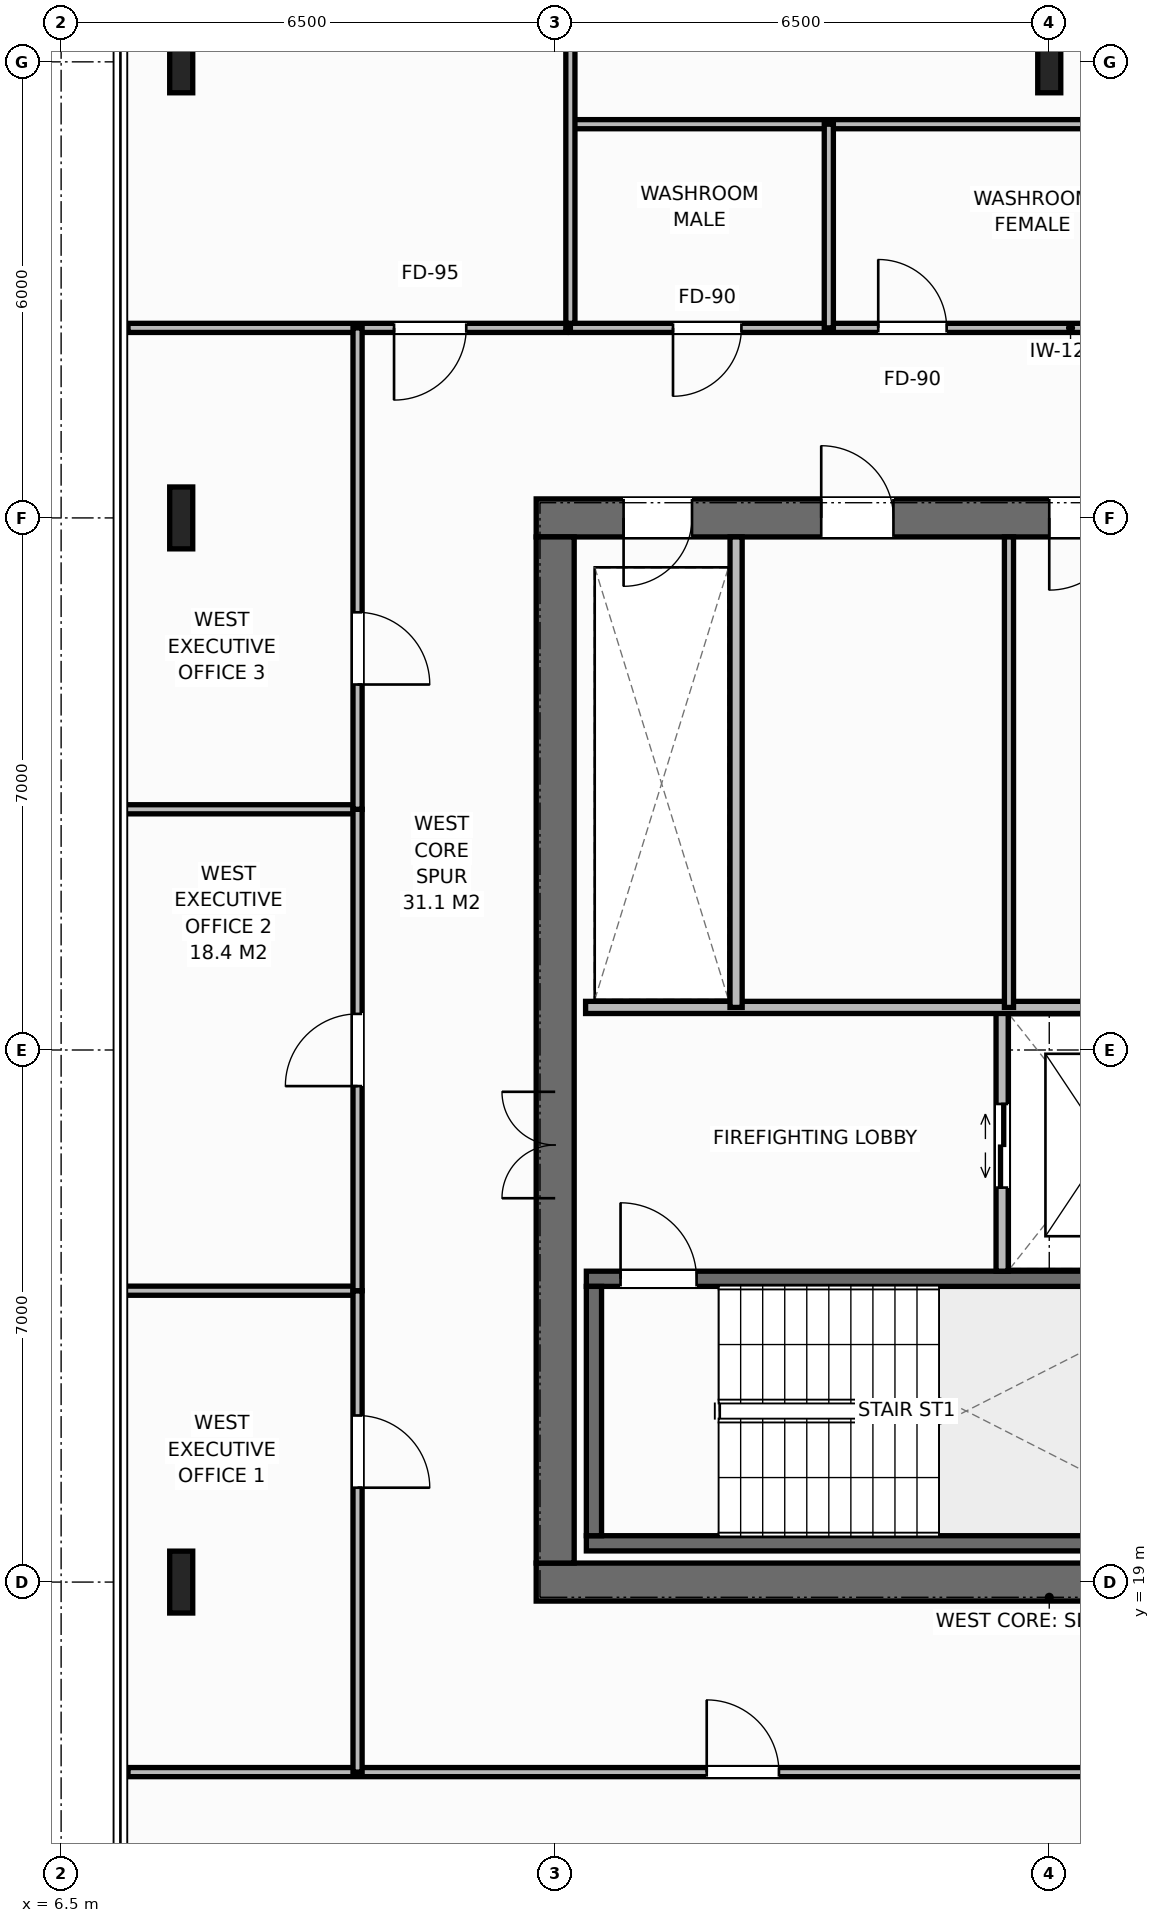
"""IFC4 building model, lengths in metres.
Left out: names, types, materials, properties, quantities, classifications, styles, units other than length and angle.
Written with IfcOpenShell. Run it as: python <this file> out.ifc"""

import sys

from ifc_helpers import new_model, si_unit, direction, frame, frame_2d, origin, origin_2d, place, context, subcontext, project, spatial, rectangle, i_section, extrude, element, fill, save


model = new_model("IFC4")
c1 = context("Model", 3, precision=1e-05, world=origin(), true_north=direction((0.0, 1.0)))
c2 = subcontext(c1, "Body", "Model", "MODEL_VIEW")
j1 = project(units=[si_unit("LENGTHUNIT", "METRE"), si_unit("PLANEANGLEUNIT", "RADIAN")], contexts=[c1])
p1 = place(None, origin())
s1 = spatial("IfcSite", under=j1, at=p1, CompositionType="ELEMENT")
p2 = place(p1, origin())
s2 = spatial("IfcBuilding", under=s1, at=p2, CompositionType="ELEMENT")
p3 = place(p2, frame((0.0, 0.0, 255.6)))
s3 = spatial("IfcBuildingStorey", under=s2, at=p3, CompositionType="ELEMENT", Elevation=255.6)
p4 = place(p3, frame((12.75, 19.0, 0.0), z_axis=(0.0, 0.0, 1.0), x_axis=(1.0, 0.0, 0.0)))
e1 = element("IfcWall", 1, at=p4, inside=s3, PredefinedType="SHEAR", context=c2, shape_type="SweptSolid", body=[
    extrude(rectangle(XDim=13.5, YDim=0.5, at=frame_2d((6.75, 0.0))), origin(), (0.0, 0.0, 1.0), 3.8),
])
p5 = place(p4, frame((9.13, 0.0, 0.0)))
e2 = element("IfcOpeningElement", 2, at=p5, cuts=e1, PredefinedType="OPENING", context=c2, shape_type="SweptSolid", body=[
    extrude(rectangle(XDim=1.4, YDim=2.2, at=frame_2d((0.7, 1.1))), frame((0.0, 0.26, 0.0), z_axis=(0.0, -1.0, 0.0), x_axis=(1.0, 0.0, 0.0)), (0.0, 0.0, 1.0), 0.52),
])
p6 = place(p3, frame((12.75, 33.0, 0.0), z_axis=(0.0, 0.0, 1.0), x_axis=(1.0, 0.0, 0.0)))
e3 = element("IfcWall", 3, at=p6, inside=s3, PredefinedType="SHEAR", context=c2, shape_type="SweptSolid", body=[
    extrude(rectangle(XDim=13.5, YDim=0.5, at=frame_2d((6.75, 0.0))), origin(), (0.0, 0.0, 1.0), 3.8),
])
p7 = place(p6, frame((1.15, 0.0, 0.0)))
e4 = element("IfcOpeningElement", 4, at=p7, cuts=e3, PredefinedType="OPENING", context=c2, shape_type="SweptSolid", body=[
    extrude(rectangle(XDim=0.9, YDim=2.15, at=frame_2d((0.45, 1.075))), frame((0.0, 0.26, 0.0), z_axis=(0.0, -1.0, 0.0), x_axis=(1.0, 0.0, 0.0)), (0.0, 0.0, 1.0), 0.52),
])
p8 = place(p6, frame((3.75, 0.0, 0.0)))
e5 = element("IfcOpeningElement", 5, at=p8, cuts=e3, PredefinedType="OPENING", context=c2, shape_type="SweptSolid", body=[
    extrude(rectangle(XDim=0.95, YDim=2.15, at=frame_2d((0.475, 1.075))), frame((0.0, 0.26, 0.0), z_axis=(0.0, -1.0, 0.0), x_axis=(1.0, 0.0, 0.0)), (0.0, 0.0, 1.0), 0.52),
])
p9 = place(p6, frame((6.75, 0.0, 0.0)))
e6 = element("IfcOpeningElement", 6, at=p9, cuts=e3, PredefinedType="OPENING", context=c2, shape_type="SweptSolid", body=[
    extrude(rectangle(XDim=0.95, YDim=2.15, at=frame_2d((0.475, 1.075))), frame((0.0, 0.26, 0.0), z_axis=(0.0, -1.0, 0.0), x_axis=(1.0, 0.0, 0.0)), (0.0, 0.0, 1.0), 0.52),
])
p10 = place(p6, frame((9.13, 0.0, 0.0)))
e7 = element("IfcOpeningElement", 7, at=p10, cuts=e3, PredefinedType="OPENING", context=c2, shape_type="SweptSolid", body=[
    extrude(rectangle(XDim=1.4, YDim=2.2, at=frame_2d((0.7, 1.1))), frame((0.0, 0.26, 0.0), z_axis=(0.0, -1.0, 0.0), x_axis=(1.0, 0.0, 0.0)), (0.0, 0.0, 1.0), 0.52),
])
p11 = place(p3, frame((13.0, 19.25, 0.0), z_axis=(0.0, 0.0, 1.0), x_axis=(0.0, 1.0, 0.0)))
e8 = element("IfcWall", 8, at=p11, inside=s3, PredefinedType="SHEAR", context=c2, shape_type="SweptSolid", body=[
    extrude(rectangle(XDim=13.5, YDim=0.5, at=frame_2d((6.75, 0.0))), origin(), (0.0, 0.0, 1.0), 3.8),
])
p12 = place(p11, frame((4.8, 0.0, 0.0)))
e9 = element("IfcOpeningElement", 9, at=p12, cuts=e8, PredefinedType="OPENING", context=c2, shape_type="SweptSolid", body=[
    extrude(rectangle(XDim=1.4, YDim=2.2, at=frame_2d((0.7, 1.1))), frame((0.0, 0.26, 0.0), z_axis=(0.0, -1.0, 0.0), x_axis=(1.0, 0.0, 0.0)), (0.0, 0.0, 1.0), 0.52),
])
p13 = place(p3, frame((13.41, 19.51, 0.0), z_axis=(0.0, 0.0, 1.0), x_axis=(1.0, 0.0, 0.0)))
e10 = element("IfcWall", 10, at=p13, inside=s3, PredefinedType="SHEAR", context=c2, shape_type="SweptSolid", body=[
    extrude(rectangle(XDim=8.43, YDim=0.2, at=frame_2d((4.215, 0.0))), origin(), (0.0, 0.0, 1.0), 3.8),
])
p14 = place(p3, frame((13.41, 22.99, 0.0), z_axis=(0.0, 0.0, 1.0), x_axis=(1.0, 0.0, 0.0)))
e11 = element("IfcWall", 11, at=p14, inside=s3, PredefinedType="SHEAR", context=c2, shape_type="SweptSolid", body=[
    extrude(rectangle(XDim=8.43, YDim=0.2, at=frame_2d((4.215, 0.0))), origin(), (0.0, 0.0, 1.0), 3.8),
])
p15 = place(p14, frame((0.45, 0.0, 0.0)))
e12 = element("IfcOpeningElement", 12, at=p15, cuts=e11, PredefinedType="OPENING", context=c2, shape_type="SweptSolid", body=[
    extrude(rectangle(XDim=1.0, YDim=2.15, at=frame_2d((0.5, 1.075))), frame((0.0, 0.11, 0.0), z_axis=(0.0, -1.0, 0.0), x_axis=(1.0, 0.0, 0.0)), (0.0, 0.0, 1.0), 0.22),
])
p16 = place(p3, frame((13.51, 19.61, 0.0), z_axis=(0.0, 0.0, 1.0), x_axis=(0.0, 1.0, 0.0)))
e13 = element("IfcWall", 13, at=p16, inside=s3, PredefinedType="SHEAR", context=c2, shape_type="SweptSolid", body=[
    extrude(rectangle(XDim=3.28, YDim=0.2, at=frame_2d((1.64, 0.0))), origin(), (0.0, 0.0, 1.0), 3.8),
])
for number, where, z_axis, x_axis in (
    (14, (19.5, 39.0, 0.0), (0.0, 0.0, 1.0), (1.0, 0.0, 0.0)),
    (15, (8.08, 19.0, 0.0), (0.0, 0.0, 1.0), (1.0, 0.0, 0.0)),
    (16, (8.08, 33.0, 0.0), (0.0, 0.0, 1.0), (1.0, 0.0, 0.0)),
    (17, (8.08, 39.0, 0.0), (0.0, 0.0, 1.0), (1.0, 0.0, 0.0)),
):
    element("IfcColumn", number, at=place(p3, frame(where, z_axis=z_axis, x_axis=x_axis)), inside=s3, PredefinedType="COLUMN", context=c2, shape_type="SweptSolid", body=[
        extrude(i_section(OverallWidth=0.303, OverallDepth=0.814, WebThickness=0.021, FlangeThickness=0.04, at=origin_2d()), origin(), (0.0, 0.0, 1.0), 3.8),
    ])
p17 = place(p3, frame((18.88, 23.09, 0.0), z_axis=(0.0, 0.0, 1.0), x_axis=(0.0, 1.0, 0.0)))
e18 = element("IfcWall", 18, at=p17, inside=s3, PredefinedType="STANDARD", context=c2, shape_type="SweptSolid", body=[
    extrude(rectangle(XDim=3.47, YDim=0.16, at=frame_2d((1.735, 0.0))), origin(), (0.0, 0.0, 1.0), 3.588),
])
p18 = place(p17, frame((1.1, 0.0, 0.0)))
e19 = element("IfcOpeningElement", 19, at=p18, cuts=e18, PredefinedType="OPENING", context=c2, shape_type="SweptSolid", body=[
    extrude(rectangle(XDim=1.1, YDim=2.2, at=frame_2d((0.55, 1.1))), frame((0.0, 0.09, 0.0), z_axis=(0.0, -1.0, 0.0), x_axis=(1.0, 0.0, 0.0)), (0.0, 0.0, 1.0), 0.18),
])
p19 = place(p3, frame((13.4, 26.56, 0.0), z_axis=(0.0, 0.0, 1.0), x_axis=(1.0, 0.0, 0.0)))
e20 = element("IfcWall", 20, at=p19, inside=s3, PredefinedType="STANDARD", context=c2, shape_type="SweptSolid", body=[
    extrude(rectangle(XDim=8.34, YDim=0.16, at=frame_2d((4.17, 0.0))), origin(), (0.0, 0.0, 1.0), 3.588),
])
p20 = place(p3, frame((15.38, 26.56, 0.0), z_axis=(0.0, 0.0, 1.0), x_axis=(0.0, 1.0, 0.0)))
e21 = element("IfcWall", 21, at=p20, inside=s3, PredefinedType="STANDARD", context=c2, shape_type="SweptSolid", body=[
    extrude(rectangle(XDim=6.19, YDim=0.16, at=frame_2d((3.095, 0.0))), origin(), (0.0, 0.0, 1.0), 3.588),
])
p21 = place(p3, frame((18.97, 26.56, 0.0), z_axis=(0.0, 0.0, 1.0), x_axis=(0.0, 1.0, 0.0)))
e22 = element("IfcWall", 22, at=p21, inside=s3, PredefinedType="PARTITIONING", context=c2, shape_type="SweptSolid", body=[
    extrude(rectangle(XDim=6.19, YDim=0.12, at=frame_2d((3.095, 0.0))), origin(), (0.0, 0.0, 1.0), 3.588),
])
p22 = place(p3, frame((13.2, 35.5, 0.0), z_axis=(0.0, 0.0, 1.0), x_axis=(1.0, 0.0, 0.0)))
e23 = element("IfcWall", 23, at=p22, inside=s3, PredefinedType="PARTITIONING", context=c2, shape_type="SweptSolid", body=[
    extrude(rectangle(XDim=13.16, YDim=0.12, at=frame_2d((6.58, 0.0))), origin(), (0.0, 0.0, 1.0), 3.588),
])
p23 = place(p22, frame((1.35, 0.0, 0.0)))
e24 = element("IfcOpeningElement", 24, at=p23, cuts=e23, PredefinedType="OPENING", context=c2, shape_type="SweptSolid", body=[
    extrude(rectangle(XDim=0.9, YDim=2.15, at=frame_2d((0.45, 1.075))), frame((0.0, 0.07, 0.0), z_axis=(0.0, -1.0, 0.0), x_axis=(1.0, 0.0, 0.0)), (0.0, 0.0, 1.0), 0.14),
])
p24 = place(p22, frame((4.05, 0.0, 0.0)))
e25 = element("IfcOpeningElement", 25, at=p24, cuts=e23, PredefinedType="OPENING", context=c2, shape_type="SweptSolid", body=[
    extrude(rectangle(XDim=0.9, YDim=2.15, at=frame_2d((0.45, 1.075))), frame((0.0, 0.07, 0.0), z_axis=(0.0, -1.0, 0.0), x_axis=(1.0, 0.0, 0.0)), (0.0, 0.0, 1.0), 0.14),
])
p25 = place(p22, frame((8.25, 0.0, 0.0)))
e26 = element("IfcOpeningElement", 26, at=p25, cuts=e23, PredefinedType="OPENING", context=c2, shape_type="SweptSolid", body=[
    extrude(rectangle(XDim=0.9, YDim=2.15, at=frame_2d((0.45, 1.075))), frame((0.0, 0.07, 0.0), z_axis=(0.0, -1.0, 0.0), x_axis=(1.0, 0.0, 0.0)), (0.0, 0.0, 1.0), 0.14),
])
p26 = place(p22, frame((11.0, 0.0, 0.0)))
e27 = element("IfcOpeningElement", 27, at=p26, cuts=e23, PredefinedType="OPENING", context=c2, shape_type="SweptSolid", body=[
    extrude(rectangle(XDim=0.95, YDim=2.15, at=frame_2d((0.475, 1.075))), frame((0.0, 0.07, 0.0), z_axis=(0.0, -1.0, 0.0), x_axis=(1.0, 0.0, 0.0)), (0.0, 0.0, 1.0), 0.14),
])
p27 = place(p3, frame((13.2, 38.18, 0.0), z_axis=(0.0, 0.0, 1.0), x_axis=(1.0, 0.0, 0.0)))
e28 = element("IfcWall", 28, at=p27, inside=s3, PredefinedType="PARTITIONING", context=c2, shape_type="SweptSolid", body=[
    extrude(rectangle(XDim=13.16, YDim=0.12, at=frame_2d((6.58, 0.0))), origin(), (0.0, 0.0, 1.0), 3.588),
])
p28 = place(p3, frame((16.6, 35.5, 0.0), z_axis=(0.0, 0.0, 1.0), x_axis=(0.0, 1.0, 0.0)))
e29 = element("IfcWall", 29, at=p28, inside=s3, PredefinedType="PARTITIONING", context=c2, shape_type="SweptSolid", body=[
    extrude(rectangle(XDim=2.68, YDim=0.12, at=frame_2d((1.34, 0.0))), origin(), (0.0, 0.0, 1.0), 3.588),
])
p29 = place(p3, frame((13.2, 35.56, 0.0), z_axis=(0.0, 0.0, 1.0), x_axis=(0.0, 1.0, 0.0)))
e30 = element("IfcWall", 30, at=p29, inside=s3, PredefinedType="PARTITIONING", context=c2, shape_type="SweptSolid", body=[
    extrude(rectangle(XDim=11.32, YDim=0.12, at=frame_2d((5.66, 0.0))), origin(), (0.0, 0.0, 1.0), 2.788),
])
p30 = place(p3, frame((7.38, 35.5, 0.0), z_axis=(0.0, 0.0, 1.0), x_axis=(1.0, 0.0, 0.0)))
e31 = element("IfcWall", 31, at=p30, inside=s3, PredefinedType="PARTITIONING", context=c2, shape_type="SweptSolid", body=[
    extrude(rectangle(XDim=5.76, YDim=0.12, at=frame_2d((2.88, 0.0))), origin(), (0.0, 0.0, 1.0), 3.588),
])
p31 = place(p30, frame((3.5, 0.0, 0.0)))
e32 = element("IfcOpeningElement", 32, at=p31, cuts=e31, PredefinedType="OPENING", context=c2, shape_type="SweptSolid", body=[
    extrude(rectangle(XDim=0.95, YDim=2.15, at=frame_2d((0.475, 1.075))), frame((0.0, 0.07, 0.0), z_axis=(0.0, -1.0, 0.0), x_axis=(1.0, 0.0, 0.0)), (0.0, 0.0, 1.0), 0.14),
])
p32 = place(p3, frame((7.38, 16.5, 0.0), z_axis=(0.0, 0.0, 1.0), x_axis=(1.0, 0.0, 0.0)))
e33 = element("IfcWall", 33, at=p32, inside=s3, PredefinedType="PARTITIONING", context=c2, shape_type="SweptSolid", body=[
    extrude(rectangle(XDim=13.157, YDim=0.12, at=frame_2d((6.579, 0.0))), origin(), (0.0, 0.0, 1.0), 3.588),
])
p33 = place(p32, frame((7.614, 0.0, 0.0)))
e34 = element("IfcOpeningElement", 34, at=p33, cuts=e33, PredefinedType="OPENING", context=c2, shape_type="SweptSolid", body=[
    extrude(rectangle(XDim=0.95, YDim=2.15, at=frame_2d((0.475, 1.075))), frame((0.0, 0.07, 0.0), z_axis=(0.0, -1.0, 0.0), x_axis=(1.0, 0.0, 0.0)), (0.0, 0.0, 1.0), 0.14),
])
p34 = place(p3, frame((7.22, 22.833, 0.0), z_axis=(0.0, 0.0, 1.0), x_axis=(1.0, 0.0, 0.0)))
e35 = element("IfcWall", 35, at=p34, inside=s3, PredefinedType="PARTITIONING", context=c2, shape_type="SweptSolid", body=[
    extrude(rectangle(XDim=3.18, YDim=0.12, at=frame_2d((1.59, 0.0))), origin(), (0.0, 0.0, 1.0), 3.588),
])
p35 = place(p3, frame((10.4, 16.5, 0.0), z_axis=(0.0, 0.0, 1.0), x_axis=(0.0, 1.0, 0.0)))
e36 = element("IfcWall", 36, at=p35, inside=s3, PredefinedType="PARTITIONING", context=c2, shape_type="SweptSolid", body=[
    extrude(rectangle(XDim=6.333, YDim=0.12, at=frame_2d((3.167, 0.0))), origin(), (0.0, 0.0, 1.0), 3.588),
])
p36 = place(p35, frame((3.742, 0.0, 0.0)))
e37 = element("IfcOpeningElement", 37, at=p36, cuts=e36, PredefinedType="OPENING", context=c2, shape_type="SweptSolid", body=[
    extrude(rectangle(XDim=0.95, YDim=2.15, at=frame_2d((0.475, 1.075))), frame((0.0, 0.07, 0.0), z_axis=(0.0, -1.0, 0.0), x_axis=(1.0, 0.0, 0.0)), (0.0, 0.0, 1.0), 0.14),
])
p37 = place(p3, frame((7.22, 29.167, 0.0), z_axis=(0.0, 0.0, 1.0), x_axis=(1.0, 0.0, 0.0)))
e38 = element("IfcWall", 38, at=p37, inside=s3, PredefinedType="PARTITIONING", context=c2, shape_type="SweptSolid", body=[
    extrude(rectangle(XDim=3.18, YDim=0.12, at=frame_2d((1.59, 0.0))), origin(), (0.0, 0.0, 1.0), 3.588),
])
p38 = place(p3, frame((10.4, 22.833, 0.0), z_axis=(0.0, 0.0, 1.0), x_axis=(0.0, 1.0, 0.0)))
e39 = element("IfcWall", 39, at=p38, inside=s3, PredefinedType="PARTITIONING", context=c2, shape_type="SweptSolid", body=[
    extrude(rectangle(XDim=6.333, YDim=0.12, at=frame_2d((3.167, 0.0))), origin(), (0.0, 0.0, 1.0), 3.588),
])
p39 = place(p38, frame((2.692, 0.0, 0.0)))
e40 = element("IfcOpeningElement", 40, at=p39, cuts=e39, PredefinedType="OPENING", context=c2, shape_type="SweptSolid", body=[
    extrude(rectangle(XDim=0.95, YDim=2.15, at=frame_2d((0.475, 1.075))), frame((0.0, 0.07, 0.0), z_axis=(0.0, -1.0, 0.0), x_axis=(1.0, 0.0, 0.0)), (0.0, 0.0, 1.0), 0.14),
])
p40 = place(p3, frame((10.4, 29.167, 0.0), z_axis=(0.0, 0.0, 1.0), x_axis=(0.0, 1.0, 0.0)))
e41 = element("IfcWall", 41, at=p40, inside=s3, PredefinedType="PARTITIONING", context=c2, shape_type="SweptSolid", body=[
    extrude(rectangle(XDim=6.333, YDim=0.12, at=frame_2d((3.167, 0.0))), origin(), (0.0, 0.0, 1.0), 3.588),
])
p41 = place(p40, frame((1.642, 0.0, 0.0)))
e42 = element("IfcOpeningElement", 42, at=p41, cuts=e41, PredefinedType="OPENING", context=c2, shape_type="SweptSolid", body=[
    extrude(rectangle(XDim=0.95, YDim=2.15, at=frame_2d((0.475, 1.075))), frame((0.0, 0.07, 0.0), z_axis=(0.0, -1.0, 0.0), x_axis=(1.0, 0.0, 0.0)), (0.0, 0.0, 1.0), 0.14),
])
p42 = place(p15, origin())
e43 = element("IfcDoor", 43, at=p42, inside=s3, OperationType="SINGLE_SWING_LEFT", PredefinedType="DOOR", context=c2, shape_type="SweptSolid", body=[
    extrude(rectangle(XDim=1.0, YDim=2.15, at=frame_2d((0.5, 1.075))), frame((0.0, 0.025, 0.0), z_axis=(0.0, -1.0, 0.0), x_axis=(1.0, 0.0, 0.0)), (0.0, 0.0, 1.0), 0.05),
])
fill(e12, e43)
p43 = place(p12, origin())
e44 = element("IfcDoor", 44, at=p43, inside=s3, OperationType="DOUBLE_DOOR_SINGLE_SWING", PredefinedType="DOOR", context=c2, shape_type="SweptSolid", body=[
    extrude(rectangle(XDim=1.4, YDim=2.2, at=frame_2d((0.7, 1.1))), frame((0.0, 0.025, 0.0), z_axis=(0.0, -1.0, 0.0), x_axis=(1.0, 0.0, 0.0)), (0.0, 0.0, 1.0), 0.05),
])
fill(e9, e44)
p44 = place(p18, origin())
e45 = element("IfcDoor", 45, at=p44, inside=s3, OperationType="DOUBLE_DOOR_SLIDING", PredefinedType="DOOR", context=c2, shape_type="SweptSolid", body=[
    extrude(rectangle(XDim=1.1, YDim=2.2, at=frame_2d((0.55, 1.1))), frame((0.0, 0.025, 0.0), z_axis=(0.0, -1.0, 0.0), x_axis=(1.0, 0.0, 0.0)), (0.0, 0.0, 1.0), 0.05),
])
fill(e19, e45)
p45 = place(p7, origin())
e46 = element("IfcDoor", 46, at=p45, inside=s3, OperationType="SINGLE_SWING_RIGHT", PredefinedType="DOOR", context=c2, shape_type="SweptSolid", body=[
    extrude(rectangle(XDim=0.9, YDim=2.15, at=frame_2d((0.45, 1.075))), frame((0.0, -0.025, 0.0), z_axis=(0.0, -1.0, 0.0), x_axis=(1.0, 0.0, 0.0)), (0.0, 0.0, 1.0), 0.05),
])
fill(e4, e46)
p46 = place(p8, origin())
e47 = element("IfcDoor", 47, at=p46, inside=s3, OperationType="SINGLE_SWING_LEFT", PredefinedType="DOOR", context=c2, shape_type="SweptSolid", body=[
    extrude(rectangle(XDim=0.95, YDim=2.15, at=frame_2d((0.475, 1.075))), frame((0.0, -0.025, 0.0), z_axis=(0.0, -1.0, 0.0), x_axis=(1.0, 0.0, 0.0)), (0.0, 0.0, 1.0), 0.05),
])
fill(e5, e47)
p47 = place(p9, origin())
e48 = element("IfcDoor", 48, at=p47, inside=s3, OperationType="SINGLE_SWING_RIGHT", PredefinedType="DOOR", context=c2, shape_type="SweptSolid", body=[
    extrude(rectangle(XDim=0.95, YDim=2.15, at=frame_2d((0.475, 1.075))), frame((0.0, -0.025, 0.0), z_axis=(0.0, -1.0, 0.0), x_axis=(1.0, 0.0, 0.0)), (0.0, 0.0, 1.0), 0.05),
])
fill(e6, e48)
p48 = place(p23, origin())
e49 = element("IfcDoor", 49, at=p48, inside=s3, OperationType="SINGLE_SWING_RIGHT", PredefinedType="DOOR", context=c2, shape_type="SweptSolid", body=[
    extrude(rectangle(XDim=0.9, YDim=2.15, at=frame_2d((0.45, 1.075))), frame((0.0, 0.025, 0.0), z_axis=(0.0, -1.0, 0.0), x_axis=(1.0, 0.0, 0.0)), (0.0, 0.0, 1.0), 0.05),
])
fill(e24, e49)
p49 = place(p24, origin())
e50 = element("IfcDoor", 50, at=p49, inside=s3, OperationType="SINGLE_SWING_LEFT", PredefinedType="DOOR", context=c2, shape_type="SweptSolid", body=[
    extrude(rectangle(XDim=0.9, YDim=2.15, at=frame_2d((0.45, 1.075))), frame((0.0, 0.025, 0.0), z_axis=(0.0, -1.0, 0.0), x_axis=(1.0, 0.0, 0.0)), (0.0, 0.0, 1.0), 0.05),
])
fill(e25, e50)
p50 = place(p31, origin())
e51 = element("IfcDoor", 51, at=p50, inside=s3, OperationType="SINGLE_SWING_RIGHT", PredefinedType="DOOR", context=c2, shape_type="SweptSolid", body=[
    extrude(rectangle(XDim=0.95, YDim=2.15, at=frame_2d((0.475, 1.075))), frame((0.0, 0.025, 0.0), z_axis=(0.0, -1.0, 0.0), x_axis=(1.0, 0.0, 0.0)), (0.0, 0.0, 1.0), 0.05),
])
fill(e32, e51)
p51 = place(p33, origin())
e52 = element("IfcDoor", 52, at=p51, inside=s3, OperationType="SINGLE_SWING_LEFT", PredefinedType="DOOR", context=c2, shape_type="SweptSolid", body=[
    extrude(rectangle(XDim=0.95, YDim=2.15, at=frame_2d((0.475, 1.075))), frame((0.0, 0.025, 0.0), z_axis=(0.0, -1.0, 0.0), x_axis=(1.0, 0.0, 0.0)), (0.0, 0.0, 1.0), 0.05),
])
fill(e34, e52)
p52 = place(p36, origin())
e53 = element("IfcDoor", 53, at=p52, inside=s3, OperationType="SINGLE_SWING_RIGHT", PredefinedType="DOOR", context=c2, shape_type="SweptSolid", body=[
    extrude(rectangle(XDim=0.95, YDim=2.15, at=frame_2d((0.475, 1.075))), frame((0.0, 0.025, 0.0), z_axis=(0.0, -1.0, 0.0), x_axis=(1.0, 0.0, 0.0)), (0.0, 0.0, 1.0), 0.05),
])
fill(e37, e53)
p53 = place(p39, origin())
e54 = element("IfcDoor", 54, at=p53, inside=s3, OperationType="SINGLE_SWING_LEFT", PredefinedType="DOOR", context=c2, shape_type="SweptSolid", body=[
    extrude(rectangle(XDim=0.95, YDim=2.15, at=frame_2d((0.475, 1.075))), frame((0.0, 0.025, 0.0), z_axis=(0.0, -1.0, 0.0), x_axis=(1.0, 0.0, 0.0)), (0.0, 0.0, 1.0), 0.05),
])
fill(e40, e54)
p54 = place(p41, origin())
e55 = element("IfcDoor", 55, at=p54, inside=s3, OperationType="SINGLE_SWING_RIGHT", PredefinedType="DOOR", context=c2, shape_type="SweptSolid", body=[
    extrude(rectangle(XDim=0.95, YDim=2.15, at=frame_2d((0.475, 1.075))), frame((0.0, 0.025, 0.0), z_axis=(0.0, -1.0, 0.0), x_axis=(1.0, 0.0, 0.0)), (0.0, 0.0, 1.0), 0.05),
])
fill(e42, e55)
save(model, sys.argv[1])
